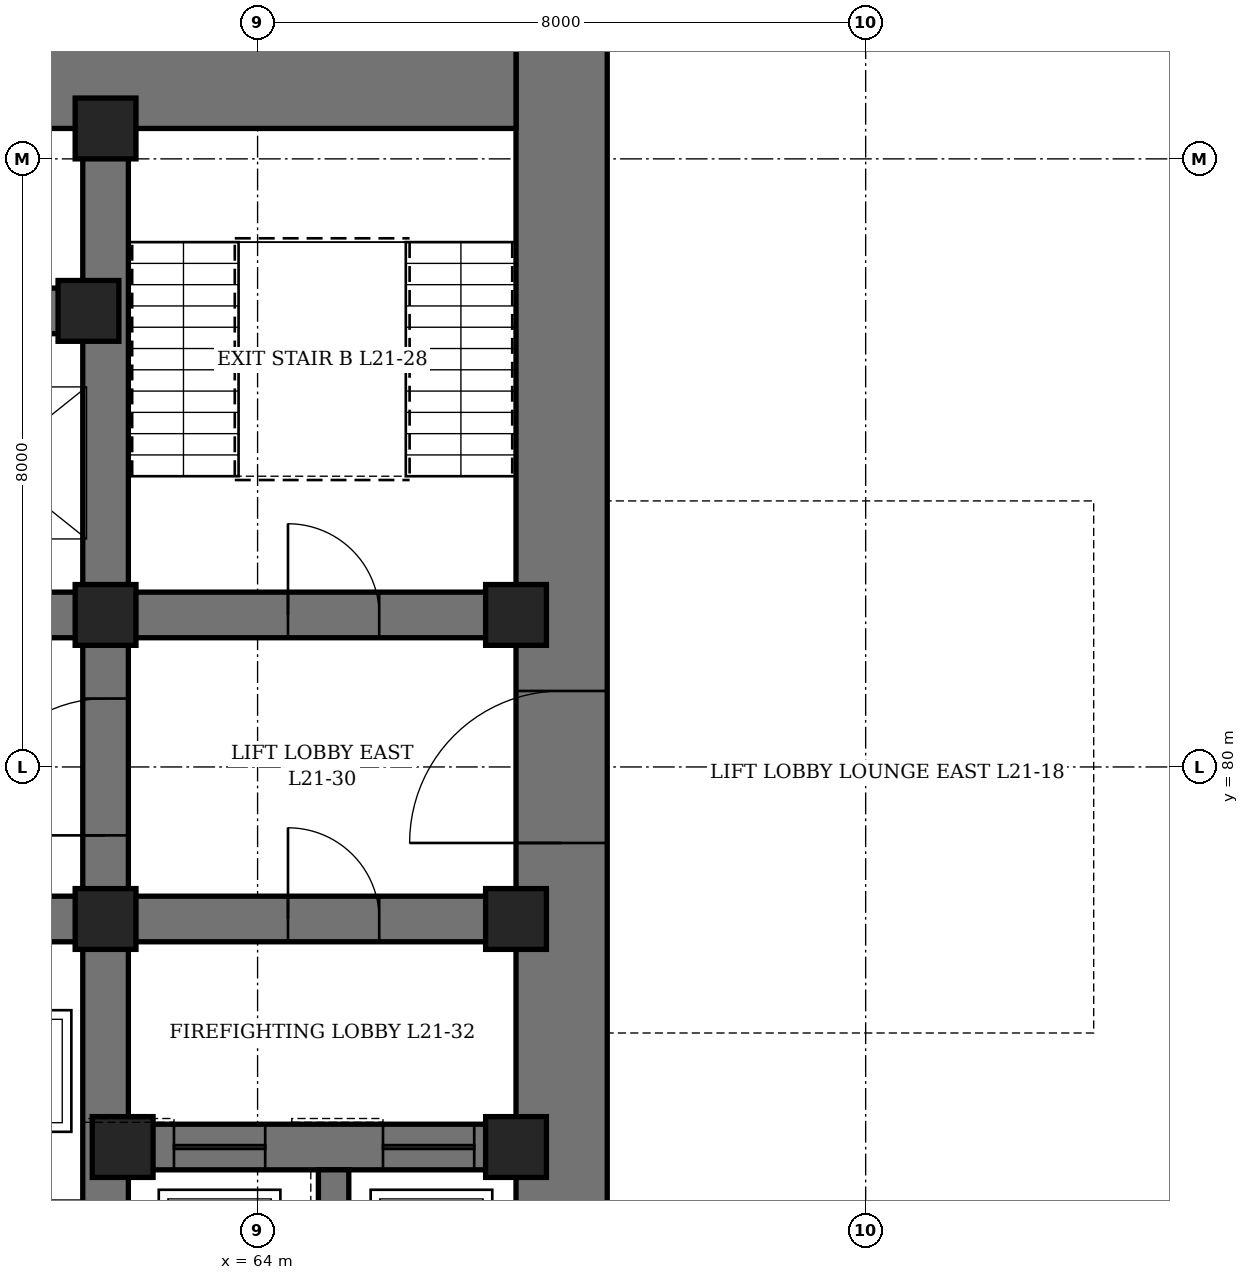
"""IFC4 building model, lengths in metres.
Left out: names, types, materials, properties, quantities, classifications, styles, units other than length and angle.
Written with IfcOpenShell. Run it as: python <this file> out.ifc"""

import sys

from ifc_helpers import new_model, si_unit, direction, frame, frame_2d, origin, origin_2d, place, context, subcontext, project, spatial, rectangle, hollow_rectangle, extrude, element, fill, save


model = new_model("IFC4")
c1 = context("Model", 3, precision=1e-05, world=origin(), true_north=direction((0.0, 1.0)))
c2 = subcontext(c1, "Body", "Model", "MODEL_VIEW")
j1 = project(units=[si_unit("LENGTHUNIT", "METRE"), si_unit("PLANEANGLEUNIT", "RADIAN")], contexts=[c1])
p1 = place(None, origin())
s1 = spatial("IfcSite", under=j1, at=p1, CompositionType="ELEMENT")
p2 = place(p1, origin())
s2 = spatial("IfcBuilding", under=s1, at=p2, CompositionType="ELEMENT")
p3 = place(p2, frame((0.0, 0.0, 97.9)))
s3 = spatial("IfcBuildingStorey", under=s2, at=p3, CompositionType="ELEMENT", Elevation=97.9)
p4 = place(p3, frame((68.0, 70.4, 0.0), z_axis=(0.0, 0.0, 1.0), x_axis=(0.0, 1.0, 0.0)))
e1 = element("IfcWall", 1, at=p4, inside=s3, PredefinedType="SHEAR", context=c2, shape_type="SweptSolid", body=[
    extrude(rectangle(XDim=19.2, YDim=1.2, at=frame_2d((9.6, 0.0))), origin(), (0.0, 0.0, 1.0), 4.2),
])
p5 = place(p4, frame((8.6, 0.0, 0.0)))
e2 = element("IfcOpeningElement", 2, at=p5, cuts=e1, PredefinedType="OPENING", context=c2, shape_type="SweptSolid", body=[
    extrude(rectangle(XDim=2.0, YDim=2.4, at=frame_2d((1.0, 1.2))), frame((0.0, 0.61, 0.0), z_axis=(0.0, -1.0, 0.0), x_axis=(1.0, 0.0, 0.0)), (0.0, 0.0, 1.0), 1.22),
])
p6 = place(p3, frame((44.6, 89.0, 0.0), z_axis=(0.0, 0.0, 1.0), x_axis=(1.0, 0.0, 0.0)))
e3 = element("IfcWall", 3, at=p6, inside=s3, PredefinedType="SHEAR", context=c2, shape_type="SweptSolid", body=[
    extrude(rectangle(XDim=22.8, YDim=1.2, at=frame_2d((11.4, 0.0))), origin(), (0.0, 0.0, 1.0), 4.2),
])
p7 = place(p6, frame((6.6, 0.0, 0.0)))
e4 = element("IfcOpeningElement", 4, at=p7, cuts=e3, PredefinedType="OPENING", context=c2, shape_type="SweptSolid", body=[
    extrude(rectangle(XDim=1.0, YDim=2.1, at=frame_2d((0.5, 1.05))), frame((0.0, 0.61, 0.0), z_axis=(0.0, -1.0, 0.0), x_axis=(1.0, 0.0, 0.0)), (0.0, 0.0, 1.0), 1.22),
])
p8 = place(p6, frame((9.45, 0.0, 0.0)))
e5 = element("IfcOpeningElement", 5, at=p8, cuts=e3, PredefinedType="OPENING", context=c2, shape_type="SweptSolid", body=[
    extrude(rectangle(XDim=0.9, YDim=2.1, at=frame_2d((0.45, 1.05))), frame((0.0, 0.61, 0.0), z_axis=(0.0, -1.0, 0.0), x_axis=(1.0, 0.0, 0.0)), (0.0, 0.0, 1.0), 1.22),
])
p9 = place(p6, frame((13.05, 0.0, 0.0)))
e6 = element("IfcOpeningElement", 6, at=p9, cuts=e3, PredefinedType="OPENING", context=c2, shape_type="SweptSolid", body=[
    extrude(rectangle(XDim=0.9, YDim=2.1, at=frame_2d((0.45, 1.05))), frame((0.0, 0.61, 0.0), z_axis=(0.0, -1.0, 0.0), x_axis=(1.0, 0.0, 0.0)), (0.0, 0.0, 1.0), 1.22),
])
p10 = place(p3, frame((62.0, 71.6, 0.0), z_axis=(0.0, 0.0, 1.0), x_axis=(0.0, 1.0, 0.0)))
e7 = element("IfcWall", 7, at=p10, inside=s3, PredefinedType="SHEAR", context=c2, shape_type="SweptSolid", body=[
    extrude(rectangle(XDim=16.8, YDim=0.6, at=frame_2d((8.4, 0.0))), origin(), (0.0, 0.0, 1.0), 4.2),
])
p11 = place(p10, frame((7.5, 0.0, 0.0)))
e8 = element("IfcOpeningElement", 8, at=p11, cuts=e7, PredefinedType="OPENING", context=c2, shape_type="SweptSolid", body=[
    extrude(rectangle(XDim=1.8, YDim=2.4, at=frame_2d((0.9, 1.2))), frame((0.0, 0.31, 0.0), z_axis=(0.0, -1.0, 0.0), x_axis=(1.0, 0.0, 0.0)), (0.0, 0.0, 1.0), 0.62),
])
p12 = place(p3, frame((62.3, 75.0, 0.0), z_axis=(0.0, 0.0, 1.0), x_axis=(1.0, 0.0, 0.0)))
e9 = element("IfcWall", 9, at=p12, inside=s3, PredefinedType="SHEAR", context=c2, shape_type="SweptSolid", body=[
    extrude(rectangle(XDim=5.1, YDim=0.6, at=frame_2d((2.55, 0.0))), origin(), (0.0, 0.0, 1.0), 4.2),
])
p13 = place(p12, frame((0.6, 0.0, 0.0)))
e10 = element("IfcOpeningElement", 10, at=p13, cuts=e9, PredefinedType="OPENING", context=c2, shape_type="SweptSolid", body=[
    extrude(rectangle(XDim=1.2, YDim=2.2, at=frame_2d((0.6, 1.1))), frame((0.0, 0.31, 0.0), z_axis=(0.0, -1.0, 0.0), x_axis=(1.0, 0.0, 0.0)), (0.0, 0.0, 1.0), 0.62),
])
p14 = place(p12, frame((3.35, 0.0, 0.0)))
e11 = element("IfcOpeningElement", 11, at=p14, cuts=e9, PredefinedType="OPENING", context=c2, shape_type="SweptSolid", body=[
    extrude(rectangle(XDim=1.2, YDim=2.2, at=frame_2d((0.6, 1.1))), frame((0.0, 0.31, 0.0), z_axis=(0.0, -1.0, 0.0), x_axis=(1.0, 0.0, 0.0)), (0.0, 0.0, 1.0), 0.62),
])
p15 = place(p3, frame((62.3, 78.0, 0.0), z_axis=(0.0, 0.0, 1.0), x_axis=(1.0, 0.0, 0.0)))
e12 = element("IfcWall", 12, at=p15, inside=s3, PredefinedType="SHEAR", context=c2, shape_type="SweptSolid", body=[
    extrude(rectangle(XDim=5.1, YDim=0.6, at=frame_2d((2.55, 0.0))), origin(), (0.0, 0.0, 1.0), 4.2),
])
p16 = place(p15, frame((2.1, 0.0, 0.0)))
e13 = element("IfcOpeningElement", 13, at=p16, cuts=e12, PredefinedType="OPENING", context=c2, shape_type="SweptSolid", body=[
    extrude(rectangle(XDim=1.2, YDim=2.1, at=frame_2d((0.6, 1.05))), frame((0.0, 0.31, 0.0), z_axis=(0.0, -1.0, 0.0), x_axis=(1.0, 0.0, 0.0)), (0.0, 0.0, 1.0), 0.62),
])
p17 = place(p3, frame((62.3, 82.0, 0.0), z_axis=(0.0, 0.0, 1.0), x_axis=(1.0, 0.0, 0.0)))
e14 = element("IfcWall", 14, at=p17, inside=s3, PredefinedType="SHEAR", context=c2, shape_type="SweptSolid", body=[
    extrude(rectangle(XDim=5.1, YDim=0.6, at=frame_2d((2.55, 0.0))), origin(), (0.0, 0.0, 1.0), 4.2),
])
p18 = place(p17, frame((2.1, 0.0, 0.0)))
e15 = element("IfcOpeningElement", 15, at=p18, cuts=e14, PredefinedType="OPENING", context=c2, shape_type="SweptSolid", body=[
    extrude(rectangle(XDim=1.2, YDim=2.1, at=frame_2d((0.6, 1.05))), frame((0.0, 0.31, 0.0), z_axis=(0.0, -1.0, 0.0), x_axis=(1.0, 0.0, 0.0)), (0.0, 0.0, 1.0), 0.62),
])
p19 = place(p3, frame((50.3, 78.0, 0.0), z_axis=(0.0, 0.0, 1.0), x_axis=(1.0, 0.0, 0.0)))
e16 = element("IfcWall", 16, at=p19, inside=s3, PredefinedType="SHEAR", context=c2, shape_type="SweptSolid", body=[
    extrude(rectangle(XDim=11.4, YDim=0.6, at=frame_2d((5.7, 0.0))), origin(), (0.0, 0.0, 1.0), 4.2),
])
p20 = place(p19, frame((0.65, 0.0, 0.0)))
e17 = element("IfcOpeningElement", 17, at=p20, cuts=e16, PredefinedType="OPENING", context=c2, shape_type="SweptSolid", body=[
    extrude(rectangle(XDim=1.1, YDim=2.2, at=frame_2d((0.55, 1.1))), frame((0.0, 0.31, 0.0), z_axis=(0.0, -1.0, 0.0), x_axis=(1.0, 0.0, 0.0)), (0.0, 0.0, 1.0), 0.62),
])
p21 = place(p19, frame((3.65, 0.0, 0.0)))
e18 = element("IfcOpeningElement", 18, at=p21, cuts=e16, PredefinedType="OPENING", context=c2, shape_type="SweptSolid", body=[
    extrude(rectangle(XDim=1.1, YDim=2.2, at=frame_2d((0.55, 1.1))), frame((0.0, 0.31, 0.0), z_axis=(0.0, -1.0, 0.0), x_axis=(1.0, 0.0, 0.0)), (0.0, 0.0, 1.0), 0.62),
])
p22 = place(p19, frame((6.65, 0.0, 0.0)))
e19 = element("IfcOpeningElement", 19, at=p22, cuts=e16, PredefinedType="OPENING", context=c2, shape_type="SweptSolid", body=[
    extrude(rectangle(XDim=1.1, YDim=2.2, at=frame_2d((0.55, 1.1))), frame((0.0, 0.31, 0.0), z_axis=(0.0, -1.0, 0.0), x_axis=(1.0, 0.0, 0.0)), (0.0, 0.0, 1.0), 0.62),
])
p23 = place(p19, frame((9.65, 0.0, 0.0)))
e20 = element("IfcOpeningElement", 20, at=p23, cuts=e16, PredefinedType="OPENING", context=c2, shape_type="SweptSolid", body=[
    extrude(rectangle(XDim=1.1, YDim=2.2, at=frame_2d((0.55, 1.1))), frame((0.0, 0.31, 0.0), z_axis=(0.0, -1.0, 0.0), x_axis=(1.0, 0.0, 0.0)), (0.0, 0.0, 1.0), 0.62),
])
for number, where, z_axis, x_axis in (
    (21, (50.3, 82.0, 0.0), (0.0, 0.0, 1.0), (1.0, 0.0, 0.0)),
    (22, (50.3, 86.0, 0.0), (0.0, 0.0, 1.0), (1.0, 0.0, 0.0)),
):
    element("IfcWall", number, at=place(p3, frame(where, z_axis=z_axis, x_axis=x_axis)), inside=s3, PredefinedType="SHEAR", context=c2, shape_type="SweptSolid", body=[
        extrude(rectangle(XDim=11.4, YDim=0.6, at=frame_2d((5.7, 0.0))), origin(), (0.0, 0.0, 1.0), 4.2),
    ])
p24 = place(p3, frame((65.0, 71.6, 0.0), z_axis=(0.0, 0.0, 1.0), x_axis=(0.0, 1.0, 0.0)))
e23 = element("IfcWall", 23, at=p24, inside=s3, PredefinedType="SHEAR", context=c2, shape_type="SweptSolid", body=[
    extrude(rectangle(XDim=3.1, YDim=0.4, at=frame_2d((1.55, 0.0))), origin(), (0.0, 0.0, 1.0), 4.2),
])
for number, where, z_axis, x_axis in (
    (24, (61.775, 86.0, 0.0), (0.0, 0.0, 1.0), (1.0, 0.0, 0.0)),
    (25, (62.0, 78.0, 0.0), (0.0, 0.0, 1.0), (1.0, 0.0, 0.0)),
    (26, (62.0, 82.0, 0.0), (0.0, 0.0, 1.0), (1.0, 0.0, 0.0)),
    (27, (62.0, 88.4, 0.0), (0.0, 0.0, 1.0), (1.0, 0.0, 0.0)),
    (28, (62.225, 75.0, 0.0), (0.0, 0.0, 1.0), (1.0, 0.0, 0.0)),
    (29, (67.4, 75.0, 0.0), (0.0, 0.0, 1.0), (1.0, 0.0, 0.0)),
    (30, (67.4, 78.0, 0.0), (0.0, 0.0, 1.0), (1.0, 0.0, 0.0)),
    (31, (67.4, 82.0, 0.0), (0.0, 0.0, 1.0), (1.0, 0.0, 0.0)),
):
    element("IfcColumn", number, at=place(p3, frame(where, z_axis=z_axis, x_axis=x_axis)), inside=s3, PredefinedType="COLUMN", context=c2, shape_type="SweptSolid", body=[
        extrude(hollow_rectangle(XDim=0.8, YDim=0.8, WallThickness=0.1, at=origin_2d()), origin(), (0.0, 0.0, 1.0), 4.2),
    ])
p25 = place(p18, origin())
e32 = element("IfcDoor", 32, at=p25, inside=s3, OperationType="SINGLE_SWING_LEFT", PredefinedType="DOOR", context=c2, shape_type="SweptSolid", body=[
    extrude(rectangle(XDim=1.2, YDim=2.1, at=frame_2d((0.6, 1.05))), frame((0.0, 0.3, 0.0), z_axis=(0.0, -1.0, 0.0), x_axis=(1.0, 0.0, 0.0)), (0.0, 0.0, 1.0), 0.6),
])
fill(e15, e32)
p26 = place(p5, origin())
e33 = element("IfcDoor", 33, at=p26, inside=s3, OperationType="DOUBLE_DOOR_SINGLE_SWING", PredefinedType="DOOR", context=c2, shape_type="SweptSolid", body=[
    extrude(rectangle(XDim=2.0, YDim=2.4, at=frame_2d((1.0, 1.2))), frame((0.0, 0.35, 0.0), z_axis=(0.0, -1.0, 0.0), x_axis=(1.0, 0.0, 0.0)), (0.0, 0.0, 1.0), 0.7),
])
fill(e2, e33)
p27 = place(p11, origin())
e34 = element("IfcDoor", 34, at=p27, inside=s3, OperationType="DOUBLE_DOOR_SINGLE_SWING", PredefinedType="DOOR", context=c2, shape_type="SweptSolid", body=[
    extrude(rectangle(XDim=1.8, YDim=2.4, at=frame_2d((0.9, 1.2))), frame((0.0, 0.3, 0.0), z_axis=(0.0, -1.0, 0.0), x_axis=(1.0, 0.0, 0.0)), (0.0, 0.0, 1.0), 0.6),
])
fill(e8, e34)
p28 = place(p16, origin())
e35 = element("IfcDoor", 35, at=p28, inside=s3, OperationType="SINGLE_SWING_RIGHT", PredefinedType="DOOR", context=c2, shape_type="SweptSolid", body=[
    extrude(rectangle(XDim=1.2, YDim=2.1, at=frame_2d((0.6, 1.05))), frame((0.0, 0.3, 0.0), z_axis=(0.0, -1.0, 0.0), x_axis=(1.0, 0.0, 0.0)), (0.0, 0.0, 1.0), 0.6),
])
fill(e13, e35)
p29 = place(p13, origin())
e36 = element("IfcDoor", 36, at=p29, inside=s3, OperationType="SLIDING_TO_LEFT", PredefinedType="DOOR", context=c2, shape_type="SweptSolid", body=[
    extrude(rectangle(XDim=1.2, YDim=2.2, at=frame_2d((0.6, 1.1))), frame((0.0, 0.3, 0.0), z_axis=(0.0, -1.0, 0.0), x_axis=(1.0, 0.0, 0.0)), (0.0, 0.0, 1.0), 0.6),
])
fill(e10, e36)
p30 = place(p14, origin())
e37 = element("IfcDoor", 37, at=p30, inside=s3, OperationType="SLIDING_TO_LEFT", PredefinedType="DOOR", context=c2, shape_type="SweptSolid", body=[
    extrude(rectangle(XDim=1.2, YDim=2.2, at=frame_2d((0.6, 1.1))), frame((0.0, 0.3, 0.0), z_axis=(0.0, -1.0, 0.0), x_axis=(1.0, 0.0, 0.0)), (0.0, 0.0, 1.0), 0.6),
])
fill(e11, e37)
save(model, sys.argv[1])
